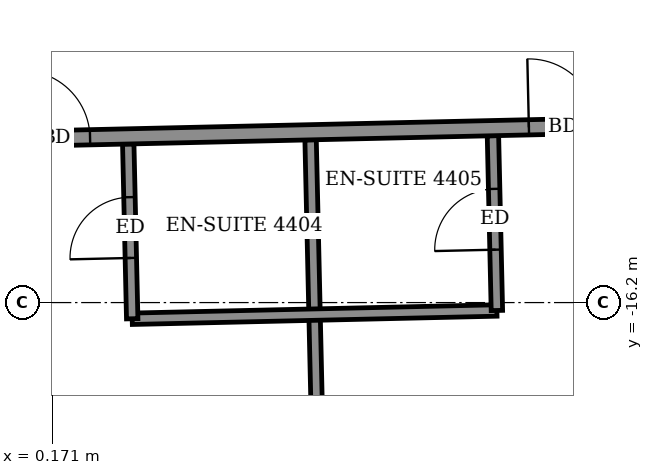
"""IFC4 building model, lengths in metres.
Left out: names, types, materials, properties, quantities, classifications, styles, units other than length and angle.
Written with IfcOpenShell. Run it as: python <this file> out.ifc"""

import sys

from ifc_helpers import new_model, si_unit, direction, frame, frame_2d, origin, place, context, subcontext, project, spatial, rectangle, extrude, element, fill, save


model = new_model("IFC4")
c1 = context("Model", 3, precision=1e-05, world=origin(), true_north=direction((0.0, 1.0)))
c2 = subcontext(c1, "Body", "Model", "MODEL_VIEW")
j1 = project(units=[si_unit("LENGTHUNIT", "METRE"), si_unit("PLANEANGLEUNIT", "RADIAN")], contexts=[c1])
p1 = place(None, origin())
s1 = spatial("IfcSite", under=j1, at=p1, CompositionType="ELEMENT")
p2 = place(p1, origin())
s2 = spatial("IfcBuilding", under=s1, at=p2, CompositionType="ELEMENT")
p3 = place(p2, frame((0.0, 0.0, 175.3)))
s3 = spatial("IfcBuildingStorey", under=s2, at=p3, CompositionType="ELEMENT", Elevation=175.3)
p4 = place(p3, frame((3.702, -20.008, 0.0), z_axis=(0.0, 0.0, 1.0), x_axis=(-0.022688785847, 0.999742576365, 0.0)))
e1 = element("IfcWall", 1, at=p4, inside=s3, PredefinedType="PARTITIONING", context=c2, shape_type="SweptSolid", body=[
    extrude(rectangle(XDim=5.95, YDim=0.15, at=frame_2d((2.975, 0.0))), origin(), (0.0, 0.0, 1.0), 2.55),
])
p5 = place(p3, frame((1.22, -16.413, 0.0), z_axis=(0.0, 0.0, 1.0), x_axis=(0.999741441463, 0.022738738327, 0.0)))
e2 = element("IfcWall", 2, at=p5, inside=s3, PredefinedType="PARTITIONING", context=c2, shape_type="SweptSolid", body=[
    extrude(rectangle(XDim=4.799, YDim=0.15, at=frame_2d((2.4, 0.0))), origin(), (0.0, 0.0, 1.0), 3.05),
])
p6 = place(p3, frame((1.22, -16.413, 0.0), z_axis=(0.0, 0.0, 1.0), x_axis=(-0.022612884682, 0.999744296031, 0.0)))
e3 = element("IfcWall", 3, at=p6, inside=s3, PredefinedType="PARTITIONING", context=c2, shape_type="SweptSolid", body=[
    extrude(rectangle(XDim=2.3, YDim=0.15, at=frame_2d((1.15, 0.0))), origin(), (0.0, 0.0, 1.0), 3.05),
])
p7 = place(p6, frame((0.8, 0.0, 0.0)))
e4 = element("IfcOpeningElement", 4, at=p7, cuts=e3, PredefinedType="OPENING", context=c2, shape_type="SweptSolid", body=[
    extrude(rectangle(XDim=0.8, YDim=2.1, at=frame_2d((0.4, 1.05))), frame((0.0, 0.085, 0.0), z_axis=(0.0, -1.0, 0.0), x_axis=(1.0, 0.0, 0.0)), (0.0, 0.0, 1.0), 0.17),
])
p8 = place(p3, frame((6.018, -16.304, 0.0), z_axis=(0.0, 0.0, 1.0), x_axis=(-0.022612884682, 0.999744296031, 0.0)))
e5 = element("IfcWall", 5, at=p8, inside=s3, PredefinedType="PARTITIONING", context=c2, shape_type="SweptSolid", body=[
    extrude(rectangle(XDim=2.3, YDim=0.15, at=frame_2d((1.15, 0.0))), origin(), (0.0, 0.0, 1.0), 3.05),
])
p9 = place(p8, frame((0.8, 0.0, 0.0)))
e6 = element("IfcOpeningElement", 6, at=p9, cuts=e5, PredefinedType="OPENING", context=c2, shape_type="SweptSolid", body=[
    extrude(rectangle(XDim=0.8, YDim=2.1, at=frame_2d((0.4, 1.05))), frame((0.0, 0.085, 0.0), z_axis=(0.0, -1.0, 0.0), x_axis=(1.0, 0.0, 0.0)), (0.0, 0.0, 1.0), 0.17),
])
p10 = place(p3, frame((-21.279, -14.523, 0.0), z_axis=(0.0, 0.0, 1.0), x_axis=(0.999742878501, 0.022675468818, 0.0)))
e7 = element("IfcWall", 7, at=p10, inside=s3, PredefinedType="PARTITIONING", context=c2, shape_type="SweptSolid", body=[
    extrude(rectangle(XDim=46.48, YDim=0.2, at=frame_2d((23.24, 0.0))), origin(), (0.0, 0.0, 1.0), 3.05),
])
p11 = place(p10, frame((1.325, 0.0, 0.0)))
e8 = element("IfcOpeningElement", 8, at=p11, cuts=e7, PredefinedType="OPENING", context=c2, shape_type="SweptSolid", body=[
    extrude(rectangle(XDim=1.0, YDim=2.1, at=frame_2d((0.5, 1.05))), frame((0.0, 0.11, 0.0), z_axis=(0.0, -1.0, 0.0), x_axis=(1.0, 0.0, 0.0)), (0.0, 0.0, 1.0), 0.22),
])
p12 = place(p10, frame((5.9, 0.0, 0.0)))
e9 = element("IfcOpeningElement", 9, at=p12, cuts=e7, PredefinedType="OPENING", context=c2, shape_type="SweptSolid", body=[
    extrude(rectangle(XDim=0.9, YDim=2.1, at=frame_2d((0.45, 1.05))), frame((0.0, 0.11, 0.0), z_axis=(0.0, -1.0, 0.0), x_axis=(1.0, 0.0, 0.0)), (0.0, 0.0, 1.0), 0.22),
])
p13 = place(p10, frame((10.6, 0.0, 0.0)))
e10 = element("IfcOpeningElement", 10, at=p13, cuts=e7, PredefinedType="OPENING", context=c2, shape_type="SweptSolid", body=[
    extrude(rectangle(XDim=0.9, YDim=2.1, at=frame_2d((0.45, 1.05))), frame((0.0, 0.11, 0.0), z_axis=(0.0, -1.0, 0.0), x_axis=(1.0, 0.0, 0.0)), (0.0, 0.0, 1.0), 0.22),
])
p14 = place(p10, frame((12.525, 0.0, 0.0)))
e11 = element("IfcOpeningElement", 11, at=p14, cuts=e7, PredefinedType="OPENING", context=c2, shape_type="SweptSolid", body=[
    extrude(rectangle(XDim=0.9, YDim=2.1, at=frame_2d((0.45, 1.05))), frame((0.0, 0.11, 0.0), z_axis=(0.0, -1.0, 0.0), x_axis=(1.0, 0.0, 0.0)), (0.0, 0.0, 1.0), 0.22),
])
p15 = place(p10, frame((19.175, 0.0, 0.0)))
e12 = element("IfcOpeningElement", 12, at=p15, cuts=e7, PredefinedType="OPENING", context=c2, shape_type="SweptSolid", body=[
    extrude(rectangle(XDim=0.9, YDim=2.1, at=frame_2d((0.45, 1.05))), frame((0.0, 0.11, 0.0), z_axis=(0.0, -1.0, 0.0), x_axis=(1.0, 0.0, 0.0)), (0.0, 0.0, 1.0), 0.22),
])
p16 = place(p10, frame((21.05, 0.0, 0.0)))
e13 = element("IfcOpeningElement", 13, at=p16, cuts=e7, PredefinedType="OPENING", context=c2, shape_type="SweptSolid", body=[
    extrude(rectangle(XDim=0.9, YDim=2.1, at=frame_2d((0.45, 1.05))), frame((0.0, 0.11, 0.0), z_axis=(0.0, -1.0, 0.0), x_axis=(1.0, 0.0, 0.0)), (0.0, 0.0, 1.0), 0.22),
])
p17 = place(p10, frame((27.725, 0.0, 0.0)))
e14 = element("IfcOpeningElement", 14, at=p17, cuts=e7, PredefinedType="OPENING", context=c2, shape_type="SweptSolid", body=[
    extrude(rectangle(XDim=0.9, YDim=2.1, at=frame_2d((0.45, 1.05))), frame((0.0, 0.11, 0.0), z_axis=(0.0, -1.0, 0.0), x_axis=(1.0, 0.0, 0.0)), (0.0, 0.0, 1.0), 0.22),
])
p18 = place(p10, frame((29.6, 0.0, 0.0)))
e15 = element("IfcOpeningElement", 15, at=p18, cuts=e7, PredefinedType="OPENING", context=c2, shape_type="SweptSolid", body=[
    extrude(rectangle(XDim=0.9, YDim=2.1, at=frame_2d((0.45, 1.05))), frame((0.0, 0.11, 0.0), z_axis=(0.0, -1.0, 0.0), x_axis=(1.0, 0.0, 0.0)), (0.0, 0.0, 1.0), 0.22),
])
p19 = place(p10, frame((36.325, 0.0, 0.0)))
e16 = element("IfcOpeningElement", 16, at=p19, cuts=e7, PredefinedType="OPENING", context=c2, shape_type="SweptSolid", body=[
    extrude(rectangle(XDim=0.9, YDim=2.1, at=frame_2d((0.45, 1.05))), frame((0.0, 0.11, 0.0), z_axis=(0.0, -1.0, 0.0), x_axis=(1.0, 0.0, 0.0)), (0.0, 0.0, 1.0), 0.22),
])
p20 = place(p10, frame((43.915, 0.0, 0.0)))
e17 = element("IfcOpeningElement", 17, at=p20, cuts=e7, PredefinedType="OPENING", context=c2, shape_type="SweptSolid", body=[
    extrude(rectangle(XDim=1.0, YDim=2.1, at=frame_2d((0.5, 1.05))), frame((0.0, 0.11, 0.0), z_axis=(0.0, -1.0, 0.0), x_axis=(1.0, 0.0, 0.0)), (0.0, 0.0, 1.0), 0.22),
])
p21 = place(p10, frame((38.6, 0.0, 0.0)))
e18 = element("IfcOpeningElement", 18, at=p21, cuts=e7, PredefinedType="OPENING", context=c2, shape_type="SweptSolid", body=[
    extrude(rectangle(XDim=0.9, YDim=2.1, at=frame_2d((0.45, 1.05))), frame((0.0, 0.11, 0.0), z_axis=(0.0, -1.0, 0.0), x_axis=(1.0, 0.0, 0.0)), (0.0, 0.0, 1.0), 0.22),
])
p22 = place(p16, origin())
e19 = element("IfcDoor", 19, at=p22, inside=s3, OperationType="SINGLE_SWING_RIGHT", PredefinedType="DOOR", context=c2, shape_type="SweptSolid", body=[
    extrude(rectangle(XDim=0.9, YDim=2.1, at=frame_2d((0.45, 1.05))), frame((0.0, 0.025, 0.0), z_axis=(0.0, -1.0, 0.0), x_axis=(1.0, 0.0, 0.0)), (0.0, 0.0, 1.0), 0.05),
])
fill(e13, e19)
p23 = place(p7, origin())
e20 = element("IfcDoor", 20, at=p23, inside=s3, OperationType="SINGLE_SWING_RIGHT", PredefinedType="DOOR", context=c2, shape_type="SweptSolid", body=[
    extrude(rectangle(XDim=0.8, YDim=2.1, at=frame_2d((0.4, 1.05))), frame((0.0, 0.025, 0.0), z_axis=(0.0, -1.0, 0.0), x_axis=(1.0, 0.0, 0.0)), (0.0, 0.0, 1.0), 0.05),
])
fill(e4, e20)
p24 = place(p17, origin())
e21 = element("IfcDoor", 21, at=p24, inside=s3, OperationType="SINGLE_SWING_LEFT", PredefinedType="DOOR", context=c2, shape_type="SweptSolid", body=[
    extrude(rectangle(XDim=0.9, YDim=2.1, at=frame_2d((0.45, 1.05))), frame((0.0, 0.025, 0.0), z_axis=(0.0, -1.0, 0.0), x_axis=(1.0, 0.0, 0.0)), (0.0, 0.0, 1.0), 0.05),
])
fill(e14, e21)
p25 = place(p9, origin())
e22 = element("IfcDoor", 22, at=p25, inside=s3, OperationType="SINGLE_SWING_LEFT", PredefinedType="DOOR", context=c2, shape_type="SweptSolid", body=[
    extrude(rectangle(XDim=0.8, YDim=2.1, at=frame_2d((0.4, 1.05))), frame((0.0, 0.025, 0.0), z_axis=(0.0, -1.0, 0.0), x_axis=(1.0, 0.0, 0.0)), (0.0, 0.0, 1.0), 0.05),
])
fill(e6, e22)
save(model, sys.argv[1])
